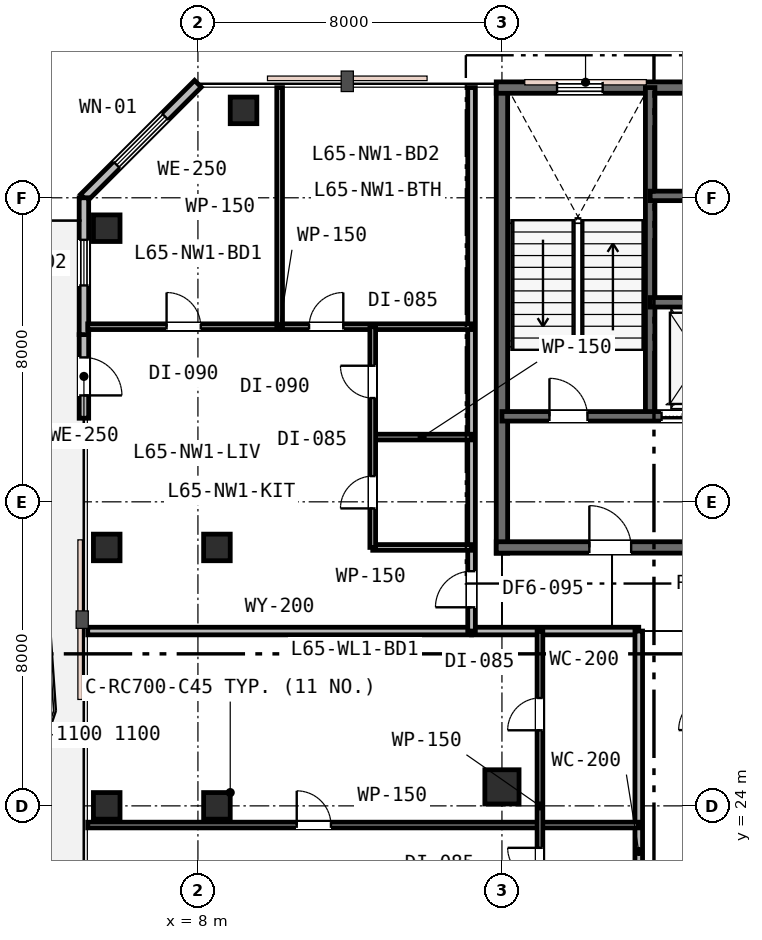
"""IFC4 building model, lengths in metres.
Left out: names, types, materials, properties, quantities, classifications, styles, units other than length and angle.
Written with IfcOpenShell. Run it as: python <this file> out.ifc"""

import sys

from ifc_helpers import new_model, si_unit, direction, frame, frame_2d, origin, origin_2d, place, context, subcontext, project, spatial, rectangle, extrude, element, fill, save


model = new_model("IFC4")
c1 = context("Model", 3, precision=1e-05, world=origin(), true_north=direction((0.0, 1.0)))
c2 = subcontext(c1, "Body", "Model", "MODEL_VIEW")
j1 = project(units=[si_unit("LENGTHUNIT", "METRE"), si_unit("PLANEANGLEUNIT", "RADIAN")], contexts=[c1])
p1 = place(None, origin())
s1 = spatial("IfcSite", under=j1, at=p1, CompositionType="ELEMENT")
p2 = place(p1, origin())
s2 = spatial("IfcBuilding", under=s1, at=p2, CompositionType="ELEMENT")
p3 = place(p2, frame((0.0, 0.0, 252.6)))
s3 = spatial("IfcBuildingStorey", under=s2, at=p3, CompositionType="ELEMENT", Elevation=252.6)
p4 = place(p3, frame((16.0, 30.65, 0.0), z_axis=(0.0, 0.0, 1.0), x_axis=(0.0, 1.0, 0.0)))
e1 = element("IfcWall", 1, at=p4, inside=s3, PredefinedType="SHEAR", context=c2, shape_type="SweptSolid", body=[
    extrude(rectangle(XDim=12.3, YDim=0.3, at=frame_2d((6.15, 0.0))), origin(), (0.0, 0.0, 1.0), 3.8),
])
p5 = place(p3, frame((15.85, 42.9, 0.0), z_axis=(0.0, 0.0, 1.0), x_axis=(1.0, 0.0, 0.0)))
e2 = element("IfcWall", 2, at=p5, inside=s3, PredefinedType="SHEAR", context=c2, shape_type="SweptSolid", body=[
    extrude(rectangle(XDim=24.3, YDim=0.3, at=frame_2d((12.15, 0.0))), origin(), (0.0, 0.0, 1.0), 3.8),
])
p6 = place(p5, frame((1.6, 0.0, 0.95)))
e3 = element("IfcOpeningElement", 3, at=p6, cuts=e2, PredefinedType="OPENING", context=c2, shape_type="SweptSolid", body=[
    extrude(rectangle(XDim=1.2, YDim=1.6, at=frame_2d((0.6, 0.8))), frame((0.0, 0.16, 0.0), z_axis=(0.0, -1.0, 0.0), x_axis=(1.0, 0.0, 0.0)), (0.0, 0.0, 1.0), 0.32),
])
p7 = place(p5, frame((16.5, 0.0, 0.95)))
e4 = element("IfcOpeningElement", 4, at=p7, cuts=e2, PredefinedType="OPENING", context=c2, shape_type="SweptSolid", body=[
    extrude(rectangle(XDim=1.2, YDim=1.6, at=frame_2d((0.6, 0.8))), frame((0.0, 0.16, 0.0), z_axis=(0.0, -1.0, 0.0), x_axis=(1.0, 0.0, 0.0)), (0.0, 0.0, 1.0), 0.32),
])
p8 = place(p5, frame((21.6, 0.0, 0.95)))
e5 = element("IfcOpeningElement", 5, at=p8, cuts=e2, PredefinedType="OPENING", context=c2, shape_type="SweptSolid", body=[
    extrude(rectangle(XDim=1.2, YDim=1.6, at=frame_2d((0.6, 0.8))), frame((0.0, 0.16, 0.0), z_axis=(0.0, -1.0, 0.0), x_axis=(1.0, 0.0, 0.0)), (0.0, 0.0, 1.0), 0.32),
])
p9 = place(p3, frame((15.85, 30.8, 0.0), z_axis=(0.0, 0.0, 1.0), x_axis=(1.0, 0.0, 0.0)))
e6 = element("IfcWall", 6, at=p9, inside=s3, PredefinedType="SHEAR", context=c2, shape_type="SweptSolid", body=[
    extrude(rectangle(XDim=11.2, YDim=0.3, at=frame_2d((5.6, 0.0))), origin(), (0.0, 0.0, 1.0), 3.8),
])
p10 = place(p9, frame((2.45, 0.0, 0.0)))
e7 = element("IfcOpeningElement", 7, at=p10, cuts=e6, PredefinedType="OPENING", context=c2, shape_type="SweptSolid", body=[
    extrude(rectangle(XDim=1.1, YDim=2.15, at=frame_2d((0.55, 1.075))), frame((0.0, 0.16, 0.0), z_axis=(0.0, -1.0, 0.0), x_axis=(1.0, 0.0, 0.0)), (0.0, 0.0, 1.0), 0.32),
])
p11 = place(p3, frame((19.9, 34.25, 0.0), z_axis=(0.0, 0.0, 1.0), x_axis=(0.0, 1.0, 0.0)))
e8 = element("IfcWall", 8, at=p11, inside=s3, PredefinedType="SHEAR", context=c2, shape_type="SweptSolid", body=[
    extrude(rectangle(XDim=8.65, YDim=0.25, at=frame_2d((4.325, 0.0))), origin(), (0.0, 0.0, 1.0), 3.8),
])
p12 = place(p3, frame((16.0, 34.25, 0.0), z_axis=(0.0, 0.0, 1.0), x_axis=(1.0, 0.0, 0.0)))
e9 = element("IfcWall", 9, at=p12, inside=s3, PredefinedType="SHEAR", context=c2, shape_type="SweptSolid", body=[
    extrude(rectangle(XDim=6.05, YDim=0.25, at=frame_2d((3.025, 0.0))), origin(), (0.0, 0.0, 1.0), 3.8),
])
p13 = place(p12, frame((1.25, 0.0, 0.0)))
e10 = element("IfcOpeningElement", 10, at=p13, cuts=e9, PredefinedType="OPENING", context=c2, shape_type="SweptSolid", body=[
    extrude(rectangle(XDim=1.0, YDim=2.15, at=frame_2d((0.5, 1.075))), frame((0.0, 0.135, 0.0), z_axis=(0.0, -1.0, 0.0), x_axis=(1.0, 0.0, 0.0)), (0.0, 0.0, 1.0), 0.27),
])
p14 = place(p12, frame((4.2, 0.0, 0.0)))
e11 = element("IfcOpeningElement", 11, at=p14, cuts=e9, PredefinedType="OPENING", context=c2, shape_type="SweptSolid", body=[
    extrude(rectangle(XDim=1.1, YDim=2.15, at=frame_2d((0.55, 1.075))), frame((0.0, 0.135, 0.0), z_axis=(0.0, -1.0, 0.0), x_axis=(1.0, 0.0, 0.0)), (0.0, 0.0, 1.0), 0.27),
])
p15 = place(p3, frame((19.9, 37.25, 0.0), z_axis=(0.0, 0.0, 1.0), x_axis=(1.0, 0.0, 0.0)))
e12 = element("IfcWall", 12, at=p15, inside=s3, PredefinedType="SHEAR", context=c2, shape_type="SweptSolid", body=[
    extrude(rectangle(XDim=16.2, YDim=0.25, at=frame_2d((8.1, 0.0))), origin(), (0.0, 0.0, 1.0), 3.8),
])
p16 = place(p15, frame((12.55, 0.0, 0.0)))
e13 = element("IfcOpeningElement", 13, at=p16, cuts=e12, PredefinedType="OPENING", context=c2, shape_type="SweptSolid", body=[
    extrude(rectangle(XDim=0.9, YDim=2.15, at=frame_2d((0.45, 1.075))), frame((0.0, 0.135, 0.0), z_axis=(0.0, -1.0, 0.0), x_axis=(1.0, 0.0, 0.0)), (0.0, 0.0, 1.0), 0.27),
])
p17 = place(p15, frame((2.5, 0.0, 0.0)))
e14 = element("IfcOpeningElement", 14, at=p17, cuts=e12, PredefinedType="OPENING", context=c2, shape_type="SweptSolid", body=[
    extrude(rectangle(XDim=1.05, YDim=2.15, at=frame_2d((0.525, 1.075))), frame((0.0, 0.135, 0.0), z_axis=(0.0, -1.0, 0.0), x_axis=(1.0, 0.0, 0.0)), (0.0, 0.0, 1.0), 0.27),
])
p18 = place(p15, frame((4.4, 0.0, 0.0)))
e15 = element("IfcOpeningElement", 15, at=p18, cuts=e12, PredefinedType="OPENING", context=c2, shape_type="SweptSolid", body=[
    extrude(rectangle(XDim=1.05, YDim=2.15, at=frame_2d((0.525, 1.075))), frame((0.0, 0.135, 0.0), z_axis=(0.0, -1.0, 0.0), x_axis=(1.0, 0.0, 0.0)), (0.0, 0.0, 1.0), 0.27),
])
p19 = place(p15, frame((6.3, 0.0, 0.0)))
e16 = element("IfcOpeningElement", 16, at=p19, cuts=e12, PredefinedType="OPENING", context=c2, shape_type="SweptSolid", body=[
    extrude(rectangle(XDim=1.05, YDim=2.15, at=frame_2d((0.525, 1.075))), frame((0.0, 0.135, 0.0), z_axis=(0.0, -1.0, 0.0), x_axis=(1.0, 0.0, 0.0)), (0.0, 0.0, 1.0), 0.27),
])
p20 = place(p3, frame((19.9, 40.05, 0.0), z_axis=(0.0, 0.0, 1.0), x_axis=(1.0, 0.0, 0.0)))
e17 = element("IfcWall", 17, at=p20, inside=s3, PredefinedType="SHEAR", context=c2, shape_type="SweptSolid", body=[
    extrude(rectangle(XDim=12.05, YDim=0.25, at=frame_2d((6.025, 0.0))), origin(), (0.0, 0.0, 1.0), 3.8),
])
p21 = place(p3, frame((8.5, 24.0, 0.0), z_axis=(0.0, 0.0, 1.0), x_axis=(1.0, 0.0, 0.0)))
e18 = element("IfcColumn", 18, at=p21, inside=s3, PredefinedType="COLUMN", context=c2, shape_type="SweptSolid", body=[
    extrude(rectangle(XDim=0.7, YDim=0.7, at=origin_2d()), origin(), (0.0, 0.0, 1.0), 3.8),
])
p22 = place(p3, frame((16.0, 24.5, 0.0), z_axis=(0.0, 0.0, 1.0), x_axis=(1.0, 0.0, 0.0)))
e19 = element("IfcColumn", 19, at=p22, inside=s3, PredefinedType="COLUMN", context=c2, shape_type="SweptSolid", body=[
    extrude(rectangle(XDim=0.9, YDim=0.9, at=origin_2d()), origin(), (0.0, 0.0, 1.0), 3.8),
])
for number, where, z_axis, x_axis in (
    (20, (5.6, 24.0, 0.0), (0.0, 0.0, 1.0), (1.0, 0.0, 0.0)),
    (21, (5.6, 30.8, 0.0), (0.0, 0.0, 1.0), (1.0, 0.0, 0.0)),
    (22, (5.6, 39.2, 0.0), (0.0, 0.0, 1.0), (1.0, 0.0, 0.0)),
    (23, (8.5, 30.8, 0.0), (0.0, 0.0, 1.0), (1.0, 0.0, 0.0)),
    (24, (9.2, 42.3, 0.0), (0.0, 0.0, 1.0), (1.0, 0.0, 0.0)),
):
    element("IfcColumn", number, at=place(p3, frame(where, z_axis=z_axis, x_axis=x_axis)), inside=s3, PredefinedType="COLUMN", context=c2, shape_type="SweptSolid", body=[
        extrude(rectangle(XDim=0.7, YDim=0.7, at=origin_2d()), origin(), (0.0, 0.0, 1.0), 3.8),
    ])
p23 = place(p3, frame((8.0, 43.0, 0.0), z_axis=(0.0, 0.0, 1.0), x_axis=(-0.707106781187, -0.707106781187, 0.0)))
e25 = element("IfcWall", 25, at=p23, inside=s3, PredefinedType="STANDARD", context=c2, shape_type="SweptSolid", body=[
    extrude(rectangle(XDim=4.243, YDim=0.25, at=frame_2d((2.121, 0.0))), origin(), (0.0, 0.0, 1.0), 3.53),
])
p24 = place(p23, frame((1.221, 0.0, 0.75)))
e26 = element("IfcOpeningElement", 26, at=p24, cuts=e25, PredefinedType="OPENING", context=c2, shape_type="SweptSolid", body=[
    extrude(rectangle(XDim=1.8, YDim=1.85, at=frame_2d((0.9, 0.925))), frame((0.0, 0.135, 0.0), z_axis=(0.0, -1.0, 0.0), x_axis=(1.0, 0.0, 0.0)), (0.0, 0.0, 1.0), 0.27),
])
p25 = place(p3, frame((5.0, 36.4, 0.0), z_axis=(0.0, 0.0, 1.0), x_axis=(0.0, -1.0, 0.0)))
e27 = element("IfcWall", 27, at=p25, inside=s3, PredefinedType="STANDARD", context=c2, shape_type="SweptSolid", body=[
    extrude(rectangle(XDim=2.2, YDim=0.25, at=frame_2d((1.1, 0.0))), origin(), (0.0, 0.0, 1.0), 3.53),
])
p26 = place(p25, frame((0.6, 0.0, 0.0)))
e28 = element("IfcOpeningElement", 28, at=p26, cuts=e27, PredefinedType="OPENING", context=c2, shape_type="SweptSolid", body=[
    extrude(rectangle(XDim=1.0, YDim=2.15, at=frame_2d((0.5, 1.075))), frame((0.0, 0.135, 0.0), z_axis=(0.0, -1.0, 0.0), x_axis=(1.0, 0.0, 0.0)), (0.0, 0.0, 1.0), 0.27),
])
p27 = place(p3, frame((5.0, 40.0, 0.0), z_axis=(0.0, 0.0, 1.0), x_axis=(0.0, -1.0, 0.0)))
e29 = element("IfcWall", 29, at=p27, inside=s3, PredefinedType="STANDARD", context=c2, shape_type="SweptSolid", body=[
    extrude(rectangle(XDim=3.6, YDim=0.25, at=frame_2d((1.8, 0.0))), origin(), (0.0, 0.0, 1.0), 3.53),
])
p28 = place(p27, frame((1.106, 0.0, 0.85)))
e30 = element("IfcOpeningElement", 30, at=p28, cuts=e29, PredefinedType="OPENING", context=c2, shape_type="SweptSolid", body=[
    extrude(rectangle(XDim=1.2, YDim=1.6, at=frame_2d((0.6, 0.8))), frame((0.0, 0.135, 0.0), z_axis=(0.0, -1.0, 0.0), x_axis=(1.0, 0.0, 0.0)), (0.0, 0.0, 1.0), 0.27),
])
p29 = place(p3, frame((5.1, 28.6, 0.0), z_axis=(0.0, 0.0, 1.0), x_axis=(1.0, 0.0, 0.0)))
e31 = element("IfcWall", 31, at=p29, inside=s3, PredefinedType="PARTITIONING", context=c2, shape_type="SweptSolid", body=[
    extrude(rectangle(XDim=10.1, YDim=0.2, at=frame_2d((5.05, 0.0))), origin(), (0.0, 0.0, 1.0), 3.16),
])
p30 = place(p3, frame((15.2, 28.6, 0.0), z_axis=(0.0, 0.0, 1.0), x_axis=(1.0, 0.0, 0.0)))
e32 = element("IfcWall", 32, at=p30, inside=s3, PredefinedType="PARTITIONING", context=c2, shape_type="SweptSolid", body=[
    extrude(rectangle(XDim=4.4, YDim=0.2, at=frame_2d((2.2, 0.0))), origin(), (0.0, 0.0, 1.0), 3.16),
])
p31 = place(p3, frame((15.2, 28.6, 0.0), z_axis=(0.0, 0.0, 1.0), x_axis=(0.0, 1.0, 0.0)))
e33 = element("IfcWall", 33, at=p31, inside=s3, PredefinedType="PARTITIONING", context=c2, shape_type="SweptSolid", body=[
    extrude(rectangle(XDim=14.3, YDim=0.2, at=frame_2d((7.15, 0.0))), origin(), (0.0, 0.0, 1.0), 3.16),
])
p32 = place(p31, frame((0.625, 0.0, 0.0)))
e34 = element("IfcOpeningElement", 34, at=p32, cuts=e33, PredefinedType="OPENING", context=c2, shape_type="SweptSolid", body=[
    extrude(rectangle(XDim=0.95, YDim=2.15, at=frame_2d((0.475, 1.075))), frame((0.0, 0.11, 0.0), z_axis=(0.0, -1.0, 0.0), x_axis=(1.0, 0.0, 0.0)), (0.0, 0.0, 1.0), 0.22),
])
p33 = place(p3, frame((12.6, 30.8, 0.0), z_axis=(0.0, 0.0, 1.0), x_axis=(1.0, 0.0, 0.0)))
e35 = element("IfcWall", 35, at=p33, inside=s3, PredefinedType="PARTITIONING", context=c2, shape_type="SweptSolid", body=[
    extrude(rectangle(XDim=2.6, YDim=0.15, at=frame_2d((1.3, 0.0))), origin(), (0.0, 0.0, 1.0), 3.16),
])
p34 = place(p3, frame((12.6, 33.704, 0.0), z_axis=(0.0, 0.0, 1.0), x_axis=(1.0, 0.0, 0.0)))
e36 = element("IfcWall", 36, at=p34, inside=s3, PredefinedType="PARTITIONING", context=c2, shape_type="SweptSolid", body=[
    extrude(rectangle(XDim=2.6, YDim=0.15, at=frame_2d((1.3, 0.0))), origin(), (0.0, 0.0, 1.0), 3.53),
])
p35 = place(p3, frame((5.1, 36.608, 0.0), z_axis=(0.0, 0.0, 1.0), x_axis=(1.0, 0.0, 0.0)))
e37 = element("IfcWall", 37, at=p35, inside=s3, PredefinedType="PARTITIONING", context=c2, shape_type="SweptSolid", body=[
    extrude(rectangle(XDim=10.1, YDim=0.15, at=frame_2d((5.05, 0.0))), origin(), (0.0, 0.0, 1.0), 3.27),
])
p36 = place(p35, frame((2.075, 0.0, 0.0)))
e38 = element("IfcOpeningElement", 38, at=p36, cuts=e37, PredefinedType="OPENING", context=c2, shape_type="SweptSolid", body=[
    extrude(rectangle(XDim=0.9, YDim=2.15, at=frame_2d((0.45, 1.075))), frame((0.0, 0.085, 0.0), z_axis=(0.0, -1.0, 0.0), x_axis=(1.0, 0.0, 0.0)), (0.0, 0.0, 1.0), 0.17),
])
p37 = place(p35, frame((5.825, 0.0, 0.0)))
e39 = element("IfcOpeningElement", 39, at=p37, cuts=e37, PredefinedType="OPENING", context=c2, shape_type="SweptSolid", body=[
    extrude(rectangle(XDim=0.9, YDim=2.15, at=frame_2d((0.45, 1.075))), frame((0.0, 0.085, 0.0), z_axis=(0.0, -1.0, 0.0), x_axis=(1.0, 0.0, 0.0)), (0.0, 0.0, 1.0), 0.17),
])
p38 = place(p3, frame((12.6, 30.8, 0.0), z_axis=(0.0, 0.0, 1.0), x_axis=(0.0, 1.0, 0.0)))
e40 = element("IfcWall", 40, at=p38, inside=s3, PredefinedType="PARTITIONING", context=c2, shape_type="SweptSolid", body=[
    extrude(rectangle(XDim=5.808, YDim=0.15, at=frame_2d((2.904, 0.0))), origin(), (0.0, 0.0, 1.0), 3.16),
])
p39 = place(p38, frame((1.027, 0.0, 0.0)))
e41 = element("IfcOpeningElement", 41, at=p39, cuts=e40, PredefinedType="OPENING", context=c2, shape_type="SweptSolid", body=[
    extrude(rectangle(XDim=0.85, YDim=2.15, at=frame_2d((0.425, 1.075))), frame((0.0, 0.085, 0.0), z_axis=(0.0, -1.0, 0.0), x_axis=(1.0, 0.0, 0.0)), (0.0, 0.0, 1.0), 0.17),
])
p40 = place(p38, frame((3.931, 0.0, 0.0)))
e42 = element("IfcOpeningElement", 42, at=p40, cuts=e40, PredefinedType="OPENING", context=c2, shape_type="SweptSolid", body=[
    extrude(rectangle(XDim=0.85, YDim=2.15, at=frame_2d((0.425, 1.075))), frame((0.0, 0.085, 0.0), z_axis=(0.0, -1.0, 0.0), x_axis=(1.0, 0.0, 0.0)), (0.0, 0.0, 1.0), 0.17),
])
p41 = place(p3, frame((10.15, 36.608, 0.0), z_axis=(0.0, 0.0, 1.0), x_axis=(0.0, 1.0, 0.0)))
e43 = element("IfcWall", 43, at=p41, inside=s3, PredefinedType="PARTITIONING", context=c2, shape_type="SweptSolid", body=[
    extrude(rectangle(XDim=6.292, YDim=0.15, at=frame_2d((3.146, 0.0))), origin(), (0.0, 0.0, 1.0), 3.53),
])
p42 = place(p3, frame((19.6, 17.0, 0.0), z_axis=(0.0, 0.0, 1.0), x_axis=(0.0, 1.0, 0.0)))
e44 = element("IfcWall", 44, at=p42, inside=s3, PredefinedType="PARTITIONING", context=c2, shape_type="SweptSolid", body=[
    extrude(rectangle(XDim=11.6, YDim=0.2, at=frame_2d((5.8, 0.0))), origin(), (0.0, 0.0, 1.0), 3.16),
])
p43 = place(p42, frame((0.723, 0.0, 0.0)))
e45 = element("IfcOpeningElement", 45, at=p43, cuts=e44, PredefinedType="OPENING", context=c2, shape_type="SweptSolid", body=[
    extrude(rectangle(XDim=0.95, YDim=2.15, at=frame_2d((0.475, 1.075))), frame((0.0, 0.11, 0.0), z_axis=(0.0, -1.0, 0.0), x_axis=(1.0, 0.0, 0.0)), (0.0, 0.0, 1.0), 0.22),
])
p44 = place(p3, frame((5.1, 23.496, 0.0), z_axis=(0.0, 0.0, 1.0), x_axis=(1.0, 0.0, 0.0)))
e46 = element("IfcWall", 46, at=p44, inside=s3, PredefinedType="PARTITIONING", context=c2, shape_type="SweptSolid", body=[
    extrude(rectangle(XDim=14.5, YDim=0.15, at=frame_2d((7.25, 0.0))), origin(), (0.0, 0.0, 1.0), 3.16),
])
p45 = place(p44, frame((5.5, 0.0, 0.0)))
e47 = element("IfcOpeningElement", 47, at=p45, cuts=e46, PredefinedType="OPENING", context=c2, shape_type="SweptSolid", body=[
    extrude(rectangle(XDim=0.9, YDim=2.15, at=frame_2d((0.45, 1.075))), frame((0.0, 0.085, 0.0), z_axis=(0.0, -1.0, 0.0), x_axis=(1.0, 0.0, 0.0)), (0.0, 0.0, 1.0), 0.17),
])
p46 = place(p3, frame((17.0, 19.396, 0.0), z_axis=(0.0, 0.0, 1.0), x_axis=(0.0, 1.0, 0.0)))
e48 = element("IfcWall", 48, at=p46, inside=s3, PredefinedType="PARTITIONING", context=c2, shape_type="SweptSolid", body=[
    extrude(rectangle(XDim=9.204, YDim=0.15, at=frame_2d((4.602, 0.0))), origin(), (0.0, 0.0, 1.0), 3.16),
])
p47 = place(p46, frame((0.6, 0.0, 0.0)))
e49 = element("IfcOpeningElement", 49, at=p47, cuts=e48, PredefinedType="OPENING", context=c2, shape_type="SweptSolid", body=[
    extrude(rectangle(XDim=0.85, YDim=2.15, at=frame_2d((0.425, 1.075))), frame((0.0, 0.085, 0.0), z_axis=(0.0, -1.0, 0.0), x_axis=(1.0, 0.0, 0.0)), (0.0, 0.0, 1.0), 0.17),
])
p48 = place(p46, frame((2.65, 0.0, 0.0)))
e50 = element("IfcOpeningElement", 50, at=p48, cuts=e48, PredefinedType="OPENING", context=c2, shape_type="SweptSolid", body=[
    extrude(rectangle(XDim=0.85, YDim=2.15, at=frame_2d((0.425, 1.075))), frame((0.0, 0.085, 0.0), z_axis=(0.0, -1.0, 0.0), x_axis=(1.0, 0.0, 0.0)), (0.0, 0.0, 1.0), 0.17),
])
p49 = place(p46, frame((6.593, 0.0, 0.0)))
e51 = element("IfcOpeningElement", 51, at=p49, cuts=e48, PredefinedType="OPENING", context=c2, shape_type="SweptSolid", body=[
    extrude(rectangle(XDim=0.85, YDim=2.15, at=frame_2d((0.425, 1.075))), frame((0.0, 0.085, 0.0), z_axis=(0.0, -1.0, 0.0), x_axis=(1.0, 0.0, 0.0)), (0.0, 0.0, 1.0), 0.17),
])
p50 = place(p6, origin())
e52 = element("IfcWindow", 52, at=p50, inside=s3, PartitioningType="SINGLE_PANEL", PredefinedType="WINDOW", context=c2, shape_type="SweptSolid", body=[
    extrude(rectangle(XDim=1.2, YDim=1.6, at=frame_2d((0.6, 0.8))), frame((0.0, 0.03, 0.0), z_axis=(0.0, -1.0, 0.0), x_axis=(1.0, 0.0, 0.0)), (0.0, 0.0, 1.0), 0.06),
])
fill(e3, e52)
p51 = place(p24, origin())
e53 = element("IfcWindow", 53, at=p51, inside=s3, PartitioningType="SINGLE_PANEL", PredefinedType="WINDOW", context=c2, shape_type="SweptSolid", body=[
    extrude(rectangle(XDim=1.8, YDim=1.85, at=frame_2d((0.9, 0.925))), frame((0.0, 0.03, 0.0), z_axis=(0.0, -1.0, 0.0), x_axis=(1.0, 0.0, 0.0)), (0.0, 0.0, 1.0), 0.06),
])
fill(e26, e53)
p52 = place(p26, origin())
e54 = element("IfcDoor", 54, at=p52, inside=s3, OperationType="SINGLE_SWING_RIGHT", PredefinedType="DOOR", context=c2, shape_type="SweptSolid", body=[
    extrude(rectangle(XDim=1.0, YDim=2.15, at=frame_2d((0.5, 1.075))), frame((0.0, 0.025, 0.0), z_axis=(0.0, -1.0, 0.0), x_axis=(1.0, 0.0, 0.0)), (0.0, 0.0, 1.0), 0.05),
])
fill(e28, e54)
p53 = place(p28, origin())
e55 = element("IfcWindow", 55, at=p53, inside=s3, PartitioningType="SINGLE_PANEL", PredefinedType="WINDOW", context=c2, shape_type="SweptSolid", body=[
    extrude(rectangle(XDim=1.2, YDim=1.6, at=frame_2d((0.6, 0.8))), frame((0.0, 0.03, 0.0), z_axis=(0.0, -1.0, 0.0), x_axis=(1.0, 0.0, 0.0)), (0.0, 0.0, 1.0), 0.06),
])
fill(e30, e55)
p54 = place(p13, origin())
e56 = element("IfcDoor", 56, at=p54, inside=s3, OperationType="SINGLE_SWING_LEFT", PredefinedType="DOOR", context=c2, shape_type="SweptSolid", body=[
    extrude(rectangle(XDim=1.0, YDim=2.15, at=frame_2d((0.5, 1.075))), frame((0.0, 0.025, 0.0), z_axis=(0.0, -1.0, 0.0), x_axis=(1.0, 0.0, 0.0)), (0.0, 0.0, 1.0), 0.05),
])
fill(e10, e56)
p55 = place(p10, origin())
e57 = element("IfcDoor", 57, at=p55, inside=s3, OperationType="SINGLE_SWING_LEFT", PredefinedType="DOOR", context=c2, shape_type="SweptSolid", body=[
    extrude(rectangle(XDim=1.1, YDim=2.15, at=frame_2d((0.55, 1.075))), frame((0.0, 0.025, 0.0), z_axis=(0.0, -1.0, 0.0), x_axis=(1.0, 0.0, 0.0)), (0.0, 0.0, 1.0), 0.05),
])
fill(e7, e57)
p56 = place(p32, origin())
e58 = element("IfcDoor", 58, at=p56, inside=s3, OperationType="SINGLE_SWING_LEFT", PredefinedType="DOOR", context=c2, shape_type="SweptSolid", body=[
    extrude(rectangle(XDim=0.95, YDim=2.15, at=frame_2d((0.475, 1.075))), frame((0.0, 0.025, 0.0), z_axis=(0.0, -1.0, 0.0), x_axis=(1.0, 0.0, 0.0)), (0.0, 0.0, 1.0), 0.05),
])
fill(e34, e58)
p57 = place(p39, origin())
e59 = element("IfcDoor", 59, at=p57, inside=s3, OperationType="SINGLE_SWING_LEFT", PredefinedType="DOOR", context=c2, shape_type="SweptSolid", body=[
    extrude(rectangle(XDim=0.85, YDim=2.15, at=frame_2d((0.425, 1.075))), frame((0.0, 0.025, 0.0), z_axis=(0.0, -1.0, 0.0), x_axis=(1.0, 0.0, 0.0)), (0.0, 0.0, 1.0), 0.05),
])
fill(e41, e59)
p58 = place(p40, origin())
e60 = element("IfcDoor", 60, at=p58, inside=s3, OperationType="SINGLE_SWING_RIGHT", PredefinedType="DOOR", context=c2, shape_type="SweptSolid", body=[
    extrude(rectangle(XDim=0.85, YDim=2.15, at=frame_2d((0.425, 1.075))), frame((0.0, 0.025, 0.0), z_axis=(0.0, -1.0, 0.0), x_axis=(1.0, 0.0, 0.0)), (0.0, 0.0, 1.0), 0.05),
])
fill(e42, e60)
p59 = place(p36, origin())
e61 = element("IfcDoor", 61, at=p59, inside=s3, OperationType="SINGLE_SWING_LEFT", PredefinedType="DOOR", context=c2, shape_type="SweptSolid", body=[
    extrude(rectangle(XDim=0.9, YDim=2.15, at=frame_2d((0.45, 1.075))), frame((0.0, 0.025, 0.0), z_axis=(0.0, -1.0, 0.0), x_axis=(1.0, 0.0, 0.0)), (0.0, 0.0, 1.0), 0.05),
])
fill(e38, e61)
p60 = place(p37, origin())
e62 = element("IfcDoor", 62, at=p60, inside=s3, OperationType="SINGLE_SWING_RIGHT", PredefinedType="DOOR", context=c2, shape_type="SweptSolid", body=[
    extrude(rectangle(XDim=0.9, YDim=2.15, at=frame_2d((0.45, 1.075))), frame((0.0, 0.025, 0.0), z_axis=(0.0, -1.0, 0.0), x_axis=(1.0, 0.0, 0.0)), (0.0, 0.0, 1.0), 0.05),
])
fill(e39, e62)
p61 = place(p48, origin())
e63 = element("IfcDoor", 63, at=p61, inside=s3, OperationType="SINGLE_SWING_RIGHT", PredefinedType="DOOR", context=c2, shape_type="SweptSolid", body=[
    extrude(rectangle(XDim=0.85, YDim=2.15, at=frame_2d((0.425, 1.075))), frame((0.0, 0.025, 0.0), z_axis=(0.0, -1.0, 0.0), x_axis=(1.0, 0.0, 0.0)), (0.0, 0.0, 1.0), 0.05),
])
fill(e50, e63)
p62 = place(p49, origin())
e64 = element("IfcDoor", 64, at=p62, inside=s3, OperationType="SINGLE_SWING_LEFT", PredefinedType="DOOR", context=c2, shape_type="SweptSolid", body=[
    extrude(rectangle(XDim=0.85, YDim=2.15, at=frame_2d((0.425, 1.075))), frame((0.0, 0.025, 0.0), z_axis=(0.0, -1.0, 0.0), x_axis=(1.0, 0.0, 0.0)), (0.0, 0.0, 1.0), 0.05),
])
fill(e51, e64)
p63 = place(p45, origin())
e65 = element("IfcDoor", 65, at=p63, inside=s3, OperationType="SINGLE_SWING_LEFT", PredefinedType="DOOR", context=c2, shape_type="SweptSolid", body=[
    extrude(rectangle(XDim=0.9, YDim=2.15, at=frame_2d((0.45, 1.075))), frame((0.0, 0.025, 0.0), z_axis=(0.0, -1.0, 0.0), x_axis=(1.0, 0.0, 0.0)), (0.0, 0.0, 1.0), 0.05),
])
fill(e47, e65)
p64 = place(p14, origin())
e66 = element("IfcDoor", 66, at=p64, inside=s3, OperationType="DOUBLE_DOOR_SLIDING", PredefinedType="DOOR", context=c2, shape_type="SweptSolid", body=[
    extrude(rectangle(XDim=1.1, YDim=2.15, at=frame_2d((0.55, 1.075))), frame((0.0, 0.025, 0.0), z_axis=(0.0, -1.0, 0.0), x_axis=(1.0, 0.0, 0.0)), (0.0, 0.0, 1.0), 0.05),
])
fill(e11, e66)
save(model, sys.argv[1])
